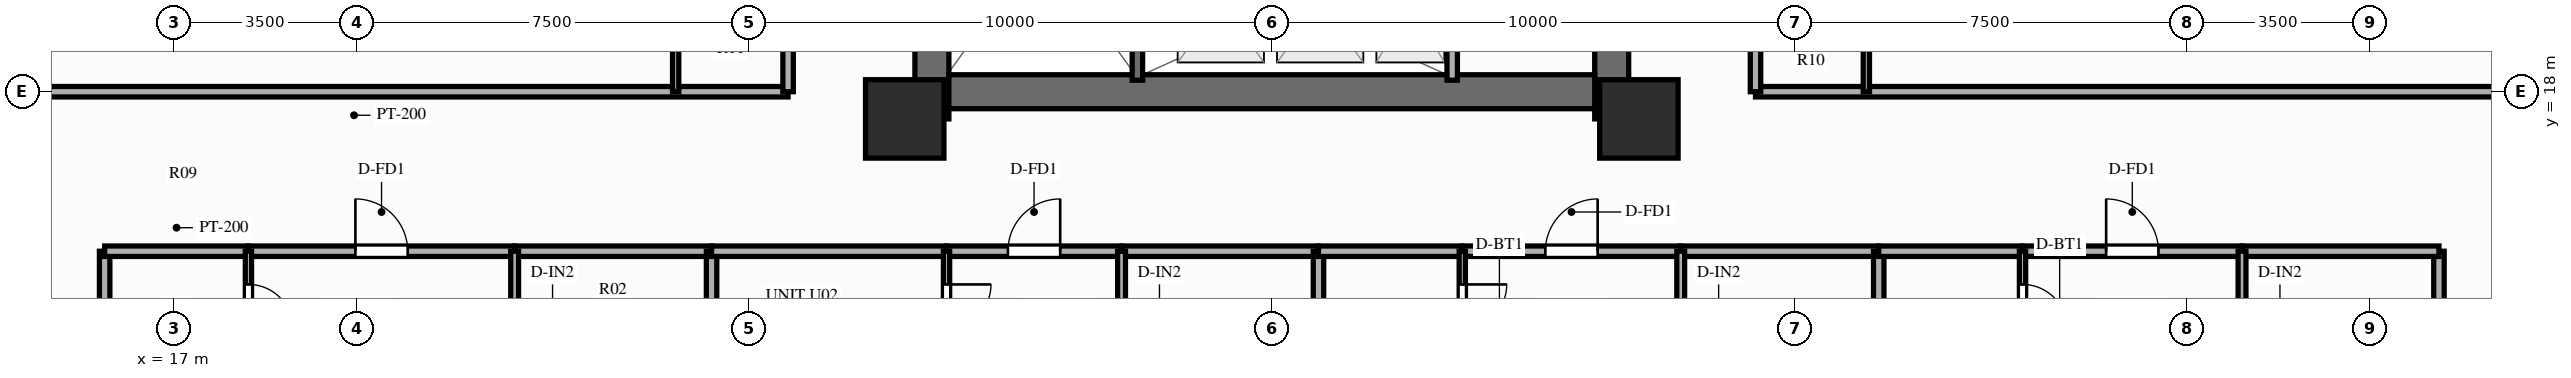
"""IFC4 building model, lengths in metres.
Left out: names, types, materials, properties, quantities, classifications, styles, units other than length and angle.
Written with IfcOpenShell. Run it as: python <this file> out.ifc"""

import sys

from ifc_helpers import new_model, si_unit, direction, frame, frame_2d, origin, origin_2d, place, context, subcontext, project, spatial, rectangle, extrude, source, transform, mapped, element, fill, save


model = new_model("IFC4")
c1 = context("Model", 3, precision=1e-05, world=origin(), true_north=direction((0.0, 1.0)))
c2 = subcontext(c1, "Body", "Model", "MODEL_VIEW")
j1 = project(units=[si_unit("LENGTHUNIT", "METRE"), si_unit("PLANEANGLEUNIT", "RADIAN")], contexts=[c1])
p1 = place(None, origin())
s1 = spatial("IfcSite", under=j1, at=p1, CompositionType="ELEMENT")
p2 = place(p1, origin())
s2 = spatial("IfcBuilding", under=s1, at=p2, CompositionType="ELEMENT")
p3 = place(p2, frame((0.0, 0.0, 34.4)))
s3 = spatial("IfcBuildingStorey", under=s2, at=p3, CompositionType="ELEMENT", Elevation=34.4)
p4 = place(p3, frame((31.5, 17.48, 0.0), z_axis=(0.0, 0.0, 1.0), x_axis=(0.0, 1.0, 0.0)))
e1 = element("IfcWall", 1, at=p4, inside=s3, PredefinedType="SHEAR", context=c2, shape_type="SweptSolid", body=[
    extrude(rectangle(XDim=19.04, YDim=0.65, at=frame_2d((9.52, 0.0))), origin(), (0.0, 0.0, 1.0), 3.0),
])
p5 = place(p4, frame((6.32, 0.0, 0.0)))
e2 = element("IfcOpeningElement", 2, at=p5, cuts=e1, PredefinedType="OPENING", context=c2, shape_type="SweptSolid", body=[
    extrude(rectangle(XDim=1.1, YDim=2.15, at=frame_2d((0.55, 1.075))), frame((0.0, 0.337, 0.0), z_axis=(0.0, -1.0, 0.0), x_axis=(1.0, 0.0, 0.0)), (0.0, 0.0, 1.0), 0.674),
])
p6 = place(p3, frame((44.5, 17.48, 0.0), z_axis=(0.0, 0.0, 1.0), x_axis=(0.0, 1.0, 0.0)))
e3 = element("IfcWall", 3, at=p6, inside=s3, PredefinedType="SHEAR", context=c2, shape_type="SweptSolid", body=[
    extrude(rectangle(XDim=19.04, YDim=0.65, at=frame_2d((9.52, 0.0))), origin(), (0.0, 0.0, 1.0), 3.0),
])
p7 = place(p6, frame((12.67, 0.0, 0.0), z_axis=(0.0, 0.0, 1.0), x_axis=(-1.0, 0.0, 0.0)))
e4 = element("IfcOpeningElement", 4, at=p7, cuts=e3, PredefinedType="OPENING", context=c2, shape_type="SweptSolid", body=[
    extrude(rectangle(XDim=1.1, YDim=2.15, at=frame_2d((0.55, 1.075))), frame((0.0, 0.337, 0.0), z_axis=(0.0, -1.0, 0.0), x_axis=(1.0, 0.0, 0.0)), (0.0, 0.0, 1.0), 0.674),
])
p8 = place(p3, frame((31.825, 18.0, 0.0), z_axis=(0.0, 0.0, 1.0), x_axis=(1.0, 0.0, 0.0)))
e5 = element("IfcWall", 5, at=p8, inside=s3, PredefinedType="SHEAR", context=c2, shape_type="SweptSolid", body=[
    extrude(rectangle(XDim=12.35, YDim=0.65, at=frame_2d((6.175, 0.0))), origin(), (0.0, 0.0, 1.0), 3.0),
])
m1 = source(origin(), c2, "Body", "SweptSolid", [
    extrude(rectangle(XDim=1.5, YDim=1.5, at=origin_2d()), origin(), (0.0, 0.0, 1.0), 3.0),
])
for number, where, z_axis, x_axis in (
    (6, (30.98, 17.48, 0.0), (0.0, 0.0, 1.0), (1.0, 0.0, 0.0)),
    (7, (45.02, 17.48, 0.0), (0.0, 0.0, 1.0), (1.0, 0.0, 0.0)),
):
    element("IfcColumn", number, at=place(p3, frame(where, z_axis=z_axis, x_axis=x_axis)), inside=s3, PredefinedType="COLUMN", context=c2, shape_type="MappedRepresentation", body=[
        mapped(m1, transform((0.0, 0.0, 0.0), scale=1.0)),
    ])
p9 = place(p3, frame((41.45, 18.22, 0.0), z_axis=(0.0, 0.0, 1.0), x_axis=(0.0, 1.0, 0.0)))
e8 = element("IfcWall", 8, at=p9, inside=s3, PredefinedType="PARTITIONING", context=c2, shape_type="SweptSolid", body=[
    extrude(rectangle(XDim=2.96, YDim=0.2, at=frame_2d((1.48, 0.0))), origin(), (0.0, 0.0, 1.0), 2.79),
])
p10 = place(p3, frame((35.43, 18.22, 0.0), z_axis=(0.0, 0.0, 1.0), x_axis=(0.0, 1.0, 0.0)))
e9 = element("IfcWall", 9, at=p10, inside=s3, PredefinedType="SOLIDWALL", context=c2, shape_type="SweptSolid", body=[
    extrude(rectangle(XDim=7.22, YDim=0.2, at=frame_2d((3.61, 0.0))), origin(), (0.0, 0.0, 1.0), 2.79),
])
p11 = place(p10, frame((6.68, 0.0, 0.0), z_axis=(0.0, 0.0, 1.0), x_axis=(-1.0, 0.0, 0.0)))
e10 = element("IfcOpeningElement", 10, at=p11, cuts=e9, PredefinedType="OPENING", context=c2, shape_type="SweptSolid", body=[
    extrude(rectangle(XDim=1.1, YDim=2.15, at=frame_2d((0.55, 1.075))), frame((0.0, 0.112, 0.0), z_axis=(0.0, -1.0, 0.0), x_axis=(1.0, 0.0, 0.0)), (0.0, 0.0, 1.0), 0.224),
])
for number, where, z_axis, x_axis in (
    (11, (15.68, 14.95, 0.0), (0.0, 0.0, 1.0), (0.0, -1.0, 0.0)),
    (12, (60.32, 14.95, 0.0), (0.0, 0.0, 1.0), (0.0, -1.0, 0.0)),
):
    element("IfcWall", number, at=place(p3, frame(where, z_axis=z_axis, x_axis=x_axis)), inside=s3, PredefinedType="PARTITIONING", context=c2, shape_type="SweptSolid", body=[
        extrude(rectangle(XDim=11.8, YDim=0.2, at=frame_2d((5.9, 0.0))), origin(), (0.0, 0.0, 1.0), 2.79),
    ])
p12 = place(p3, frame((15.68, 14.95, 0.0), z_axis=(0.0, 0.0, 1.0), x_axis=(1.0, 0.0, 0.0)))
e13 = element("IfcWall", 13, at=p12, inside=s3, PredefinedType="PARTITIONING", context=c2, shape_type="SweptSolid", body=[
    extrude(rectangle(XDim=2.75, YDim=0.2, at=frame_2d((1.375, 0.0))), origin(), (0.0, 0.0, 1.0), 2.79),
])
p13 = place(p3, frame((18.43, 14.95, 0.0), z_axis=(0.0, 0.0, 1.0), x_axis=(1.0, 0.0, 0.0)))
e14 = element("IfcWall", 14, at=p13, inside=s3, PredefinedType="PARTITIONING", context=c2, shape_type="SweptSolid", body=[
    extrude(rectangle(XDim=5.091, YDim=0.2, at=frame_2d((2.545, 0.0))), origin(), (0.0, 0.0, 1.0), 2.79),
])
p14 = place(p13, frame((2.045, 0.0, 0.0)))
e15 = element("IfcOpeningElement", 15, at=p14, cuts=e14, PredefinedType="OPENING", context=c2, shape_type="SweptSolid", body=[
    extrude(rectangle(XDim=1.0, YDim=2.15, at=frame_2d((0.5, 1.075))), frame((0.0, 0.112, 0.0), z_axis=(0.0, -1.0, 0.0), x_axis=(1.0, 0.0, 0.0)), (0.0, 0.0, 1.0), 0.224),
])
p15 = place(p3, frame((23.521, 14.95, 0.0), z_axis=(0.0, 0.0, 1.0), x_axis=(1.0, 0.0, 0.0)))
e16 = element("IfcWall", 16, at=p15, inside=s3, PredefinedType="PARTITIONING", context=c2, shape_type="SweptSolid", body=[
    extrude(rectangle(XDim=3.766, YDim=0.2, at=frame_2d((1.883, 0.0))), origin(), (0.0, 0.0, 1.0), 2.79),
])
p16 = place(p3, frame((18.43, 14.95, 0.0), z_axis=(0.0, 0.0, 1.0), x_axis=(0.0, -1.0, 0.0)))
e17 = element("IfcWall", 17, at=p16, inside=s3, PredefinedType="PARTITIONING", context=c2, shape_type="SweptSolid", body=[
    extrude(rectangle(XDim=2.12, YDim=0.12, at=frame_2d((1.06, 0.0))), origin(), (0.0, 0.0, 1.0), 2.79),
])
p17 = place(p16, frame((0.635, 0.0, 0.0)))
e18 = element("IfcOpeningElement", 18, at=p17, cuts=e17, PredefinedType="OPENING", context=c2, shape_type="SweptSolid", body=[
    extrude(rectangle(XDim=0.85, YDim=2.05, at=frame_2d((0.425, 1.025))), frame((0.0, 0.072, 0.0), z_axis=(0.0, -1.0, 0.0), x_axis=(1.0, 0.0, 0.0)), (0.0, 0.0, 1.0), 0.144),
])
p18 = place(p3, frame((23.521, 14.95, 0.0), z_axis=(0.0, 0.0, 1.0), x_axis=(0.0, -1.0, 0.0)))
e19 = element("IfcWall", 19, at=p18, inside=s3, PredefinedType="PARTITIONING", context=c2, shape_type="SweptSolid", body=[
    extrude(rectangle(XDim=3.17, YDim=0.15, at=frame_2d((1.585, 0.0))), origin(), (0.0, 0.0, 1.0), 2.79),
])
p19 = place(p18, frame((1.135, 0.0, 0.0)))
e20 = element("IfcOpeningElement", 20, at=p19, cuts=e19, PredefinedType="OPENING", context=c2, shape_type="SweptSolid", body=[
    extrude(rectangle(XDim=0.9, YDim=2.1, at=frame_2d((0.45, 1.05))), frame((0.0, 0.087, 0.0), z_axis=(0.0, -1.0, 0.0), x_axis=(1.0, 0.0, 0.0)), (0.0, 0.0, 1.0), 0.174),
])
p20 = place(p3, frame((27.286, 14.95, 0.0), z_axis=(0.0, 0.0, 1.0), x_axis=(0.0, -1.0, 0.0)))
e21 = element("IfcWall", 21, at=p20, inside=s3, PredefinedType="PARTITIONING", context=c2, shape_type="SweptSolid", body=[
    extrude(rectangle(XDim=11.8, YDim=0.2, at=frame_2d((5.9, 0.0))), origin(), (0.0, 0.0, 1.0), 2.79),
])
p21 = place(p3, frame((27.286, 14.95, 0.0), z_axis=(0.0, 0.0, 1.0), x_axis=(1.0, 0.0, 0.0)))
e22 = element("IfcWall", 22, at=p21, inside=s3, PredefinedType="PARTITIONING", context=c2, shape_type="SweptSolid", body=[
    extrude(rectangle(XDim=4.494, YDim=0.2, at=frame_2d((2.247, 0.0))), origin(), (0.0, 0.0, 1.0), 2.79),
])
p22 = place(p3, frame((31.78, 14.95, 0.0), z_axis=(0.0, 0.0, 1.0), x_axis=(1.0, 0.0, 0.0)))
e23 = element("IfcWall", 23, at=p22, inside=s3, PredefinedType="PARTITIONING", context=c2, shape_type="SweptSolid", body=[
    extrude(rectangle(XDim=3.347, YDim=0.2, at=frame_2d((1.673, 0.0))), origin(), (0.0, 0.0, 1.0), 2.79),
])
p23 = place(p22, frame((1.173, 0.0, 0.0)))
e24 = element("IfcOpeningElement", 24, at=p23, cuts=e23, PredefinedType="OPENING", context=c2, shape_type="SweptSolid", body=[
    extrude(rectangle(XDim=1.0, YDim=2.15, at=frame_2d((0.5, 1.075))), frame((0.0, 0.112, 0.0), z_axis=(0.0, -1.0, 0.0), x_axis=(1.0, 0.0, 0.0)), (0.0, 0.0, 1.0), 0.224),
])
p24 = place(p3, frame((35.127, 14.95, 0.0), z_axis=(0.0, 0.0, 1.0), x_axis=(1.0, 0.0, 0.0)))
e25 = element("IfcWall", 25, at=p24, inside=s3, PredefinedType="PARTITIONING", context=c2, shape_type="SweptSolid", body=[
    extrude(rectangle(XDim=3.766, YDim=0.2, at=frame_2d((1.883, 0.0))), origin(), (0.0, 0.0, 1.0), 2.79),
])
p25 = place(p3, frame((31.78, 14.95, 0.0), z_axis=(0.0, 0.0, 1.0), x_axis=(0.0, -1.0, 0.0)))
e26 = element("IfcWall", 26, at=p25, inside=s3, PredefinedType="PARTITIONING", context=c2, shape_type="SweptSolid", body=[
    extrude(rectangle(XDim=2.12, YDim=0.12, at=frame_2d((1.06, 0.0))), origin(), (0.0, 0.0, 1.0), 2.79),
])
p26 = place(p25, frame((0.635, 0.0, 0.0)))
e27 = element("IfcOpeningElement", 27, at=p26, cuts=e26, PredefinedType="OPENING", context=c2, shape_type="SweptSolid", body=[
    extrude(rectangle(XDim=0.85, YDim=2.05, at=frame_2d((0.425, 1.025))), frame((0.0, 0.072, 0.0), z_axis=(0.0, -1.0, 0.0), x_axis=(1.0, 0.0, 0.0)), (0.0, 0.0, 1.0), 0.144),
])
p27 = place(p3, frame((35.127, 14.95, 0.0), z_axis=(0.0, 0.0, 1.0), x_axis=(0.0, -1.0, 0.0)))
e28 = element("IfcWall", 28, at=p27, inside=s3, PredefinedType="PARTITIONING", context=c2, shape_type="SweptSolid", body=[
    extrude(rectangle(XDim=3.17, YDim=0.15, at=frame_2d((1.585, 0.0))), origin(), (0.0, 0.0, 1.0), 2.79),
])
p28 = place(p27, frame((1.135, 0.0, 0.0)))
e29 = element("IfcOpeningElement", 29, at=p28, cuts=e28, PredefinedType="OPENING", context=c2, shape_type="SweptSolid", body=[
    extrude(rectangle(XDim=0.9, YDim=2.1, at=frame_2d((0.45, 1.05))), frame((0.0, 0.087, 0.0), z_axis=(0.0, -1.0, 0.0), x_axis=(1.0, 0.0, 0.0)), (0.0, 0.0, 1.0), 0.174),
])
p29 = place(p3, frame((38.893, 14.95, 0.0), z_axis=(0.0, 0.0, 1.0), x_axis=(0.0, -1.0, 0.0)))
e30 = element("IfcWall", 30, at=p29, inside=s3, PredefinedType="PARTITIONING", context=c2, shape_type="SweptSolid", body=[
    extrude(rectangle(XDim=11.8, YDim=0.2, at=frame_2d((5.9, 0.0))), origin(), (0.0, 0.0, 1.0), 2.79),
])
p30 = place(p3, frame((38.893, 14.95, 0.0), z_axis=(0.0, 0.0, 1.0), x_axis=(1.0, 0.0, 0.0)))
e31 = element("IfcWall", 31, at=p30, inside=s3, PredefinedType="PARTITIONING", context=c2, shape_type="SweptSolid", body=[
    extrude(rectangle(XDim=2.75, YDim=0.2, at=frame_2d((1.375, 0.0))), origin(), (0.0, 0.0, 1.0), 2.79),
])
p31 = place(p3, frame((41.643, 14.95, 0.0), z_axis=(0.0, 0.0, 1.0), x_axis=(1.0, 0.0, 0.0)))
e32 = element("IfcWall", 32, at=p31, inside=s3, PredefinedType="PARTITIONING", context=c2, shape_type="SweptSolid", body=[
    extrude(rectangle(XDim=4.177, YDim=0.2, at=frame_2d((2.089, 0.0))), origin(), (0.0, 0.0, 1.0), 2.79),
])
p32 = place(p31, frame((1.589, 0.0, 0.0)))
e33 = element("IfcOpeningElement", 33, at=p32, cuts=e32, PredefinedType="OPENING", context=c2, shape_type="SweptSolid", body=[
    extrude(rectangle(XDim=1.0, YDim=2.15, at=frame_2d((0.5, 1.075))), frame((0.0, 0.112, 0.0), z_axis=(0.0, -1.0, 0.0), x_axis=(1.0, 0.0, 0.0)), (0.0, 0.0, 1.0), 0.224),
])
p33 = place(p3, frame((45.82, 14.95, 0.0), z_axis=(0.0, 0.0, 1.0), x_axis=(1.0, 0.0, 0.0)))
e34 = element("IfcWall", 34, at=p33, inside=s3, PredefinedType="PARTITIONING", context=c2, shape_type="SweptSolid", body=[
    extrude(rectangle(XDim=3.786, YDim=0.2, at=frame_2d((1.893, 0.0))), origin(), (0.0, 0.0, 1.0), 2.79),
])
p34 = place(p3, frame((41.643, 14.95, 0.0), z_axis=(0.0, 0.0, 1.0), x_axis=(0.0, -1.0, 0.0)))
e35 = element("IfcWall", 35, at=p34, inside=s3, PredefinedType="PARTITIONING", context=c2, shape_type="SweptSolid", body=[
    extrude(rectangle(XDim=2.12, YDim=0.12, at=frame_2d((1.06, 0.0))), origin(), (0.0, 0.0, 1.0), 2.79),
])
p35 = place(p34, frame((0.635, 0.0, 0.0)))
e36 = element("IfcOpeningElement", 36, at=p35, cuts=e35, PredefinedType="OPENING", context=c2, shape_type="SweptSolid", body=[
    extrude(rectangle(XDim=0.85, YDim=2.05, at=frame_2d((0.425, 1.025))), frame((0.0, 0.072, 0.0), z_axis=(0.0, -1.0, 0.0), x_axis=(1.0, 0.0, 0.0)), (0.0, 0.0, 1.0), 0.144),
])
p36 = place(p3, frame((45.82, 14.95, 0.0), z_axis=(0.0, 0.0, 1.0), x_axis=(0.0, -1.0, 0.0)))
e37 = element("IfcWall", 37, at=p36, inside=s3, PredefinedType="PARTITIONING", context=c2, shape_type="SweptSolid", body=[
    extrude(rectangle(XDim=3.17, YDim=0.15, at=frame_2d((1.585, 0.0))), origin(), (0.0, 0.0, 1.0), 2.79),
])
p37 = place(p36, frame((1.135, 0.0, 0.0)))
e38 = element("IfcOpeningElement", 38, at=p37, cuts=e37, PredefinedType="OPENING", context=c2, shape_type="SweptSolid", body=[
    extrude(rectangle(XDim=0.9, YDim=2.1, at=frame_2d((0.45, 1.05))), frame((0.0, 0.087, 0.0), z_axis=(0.0, -1.0, 0.0), x_axis=(1.0, 0.0, 0.0)), (0.0, 0.0, 1.0), 0.174),
])
p38 = place(p3, frame((49.606, 14.95, 0.0), z_axis=(0.0, 0.0, 1.0), x_axis=(0.0, -1.0, 0.0)))
e39 = element("IfcWall", 39, at=p38, inside=s3, PredefinedType="PARTITIONING", context=c2, shape_type="SweptSolid", body=[
    extrude(rectangle(XDim=11.8, YDim=0.2, at=frame_2d((5.9, 0.0))), origin(), (0.0, 0.0, 1.0), 2.79),
])
p39 = place(p3, frame((49.606, 14.95, 0.0), z_axis=(0.0, 0.0, 1.0), x_axis=(1.0, 0.0, 0.0)))
e40 = element("IfcWall", 40, at=p39, inside=s3, PredefinedType="PARTITIONING", context=c2, shape_type="SweptSolid", body=[
    extrude(rectangle(XDim=2.75, YDim=0.2, at=frame_2d((1.375, 0.0))), origin(), (0.0, 0.0, 1.0), 2.79),
])
p40 = place(p3, frame((52.356, 14.95, 0.0), z_axis=(0.0, 0.0, 1.0), x_axis=(1.0, 0.0, 0.0)))
e41 = element("IfcWall", 41, at=p40, inside=s3, PredefinedType="PARTITIONING", context=c2, shape_type="SweptSolid", body=[
    extrude(rectangle(XDim=4.198, YDim=0.2, at=frame_2d((2.099, 0.0))), origin(), (0.0, 0.0, 1.0), 2.79),
])
p41 = place(p40, frame((1.599, 0.0, 0.0)))
e42 = element("IfcOpeningElement", 42, at=p41, cuts=e41, PredefinedType="OPENING", context=c2, shape_type="SweptSolid", body=[
    extrude(rectangle(XDim=1.0, YDim=2.15, at=frame_2d((0.5, 1.075))), frame((0.0, 0.112, 0.0), z_axis=(0.0, -1.0, 0.0), x_axis=(1.0, 0.0, 0.0)), (0.0, 0.0, 1.0), 0.224),
])
p42 = place(p3, frame((56.554, 14.95, 0.0), z_axis=(0.0, 0.0, 1.0), x_axis=(1.0, 0.0, 0.0)))
e43 = element("IfcWall", 43, at=p42, inside=s3, PredefinedType="PARTITIONING", context=c2, shape_type="SweptSolid", body=[
    extrude(rectangle(XDim=3.766, YDim=0.2, at=frame_2d((1.883, 0.0))), origin(), (0.0, 0.0, 1.0), 2.79),
])
p43 = place(p3, frame((52.356, 14.95, 0.0), z_axis=(0.0, 0.0, 1.0), x_axis=(0.0, -1.0, 0.0)))
e44 = element("IfcWall", 44, at=p43, inside=s3, PredefinedType="PARTITIONING", context=c2, shape_type="SweptSolid", body=[
    extrude(rectangle(XDim=2.12, YDim=0.12, at=frame_2d((1.06, 0.0))), origin(), (0.0, 0.0, 1.0), 2.79),
])
p44 = place(p43, frame((0.635, 0.0, 0.0)))
e45 = element("IfcOpeningElement", 45, at=p44, cuts=e44, PredefinedType="OPENING", context=c2, shape_type="SweptSolid", body=[
    extrude(rectangle(XDim=0.85, YDim=2.05, at=frame_2d((0.425, 1.025))), frame((0.0, 0.072, 0.0), z_axis=(0.0, -1.0, 0.0), x_axis=(1.0, 0.0, 0.0)), (0.0, 0.0, 1.0), 0.144),
])
p45 = place(p3, frame((56.554, 14.95, 0.0), z_axis=(0.0, 0.0, 1.0), x_axis=(0.0, -1.0, 0.0)))
e46 = element("IfcWall", 46, at=p45, inside=s3, PredefinedType="PARTITIONING", context=c2, shape_type="SweptSolid", body=[
    extrude(rectangle(XDim=3.17, YDim=0.15, at=frame_2d((1.585, 0.0))), origin(), (0.0, 0.0, 1.0), 2.79),
])
p46 = place(p45, frame((1.135, 0.0, 0.0)))
e47 = element("IfcOpeningElement", 47, at=p46, cuts=e46, PredefinedType="OPENING", context=c2, shape_type="SweptSolid", body=[
    extrude(rectangle(XDim=0.9, YDim=2.1, at=frame_2d((0.45, 1.05))), frame((0.0, 0.087, 0.0), z_axis=(0.0, -1.0, 0.0), x_axis=(1.0, 0.0, 0.0)), (0.0, 0.0, 1.0), 0.174),
])
p47 = place(p3, frame((28.75, 18.0, 0.0), z_axis=(0.0, 0.0, 1.0), x_axis=(-1.0, 0.0, 0.0)))
e48 = element("IfcWall", 48, at=p47, inside=s3, PredefinedType="PARTITIONING", context=c2, shape_type="SweptSolid", body=[
    extrude(rectangle(XDim=16.6, YDim=0.2, at=frame_2d((8.3, 0.0))), origin(), (0.0, 0.0, 1.0), 2.24),
])
p48 = place(p3, frame((28.75, 18.0, 0.0), z_axis=(0.0, 0.0, 1.0), x_axis=(0.0, 1.0, 0.0)))
e49 = element("IfcWall", 49, at=p48, inside=s3, PredefinedType="PARTITIONING", context=c2, shape_type="SweptSolid", body=[
    extrude(rectangle(XDim=2.807, YDim=0.2, at=frame_2d((1.404, 0.0))), origin(), (0.0, 0.0, 1.0), 2.79),
])
p49 = place(p3, frame((26.6, 18.0, 0.0), z_axis=(0.0, 0.0, 1.0), x_axis=(0.0, 1.0, 0.0)))
e50 = element("IfcWall", 50, at=p49, inside=s3, PredefinedType="PARTITIONING", context=c2, shape_type="SweptSolid", body=[
    extrude(rectangle(XDim=2.807, YDim=0.12, at=frame_2d((1.404, 0.0))), origin(), (0.0, 0.0, 1.0), 2.79),
])
p50 = place(p3, frame((47.25, 18.0, 0.0), z_axis=(0.0, 0.0, 1.0), x_axis=(1.0, 0.0, 0.0)))
e51 = element("IfcWall", 51, at=p50, inside=s3, PredefinedType="PARTITIONING", context=c2, shape_type="SweptSolid", body=[
    extrude(rectangle(XDim=16.6, YDim=0.2, at=frame_2d((8.3, 0.0))), origin(), (0.0, 0.0, 1.0), 2.24),
])
p51 = place(p3, frame((47.25, 18.0, 0.0), z_axis=(0.0, 0.0, 1.0), x_axis=(0.0, 1.0, 0.0)))
e52 = element("IfcWall", 52, at=p51, inside=s3, PredefinedType="PARTITIONING", context=c2, shape_type="SweptSolid", body=[
    extrude(rectangle(XDim=2.513, YDim=0.2, at=frame_2d((1.256, 0.0))), origin(), (0.0, 0.0, 1.0), 2.79),
])
p52 = place(p3, frame((49.37, 18.0, 0.0), z_axis=(0.0, 0.0, 1.0), x_axis=(0.0, 1.0, 0.0)))
e53 = element("IfcWall", 53, at=p52, inside=s3, PredefinedType="PARTITIONING", context=c2, shape_type="SweptSolid", body=[
    extrude(rectangle(XDim=2.513, YDim=0.12, at=frame_2d((1.256, 0.0))), origin(), (0.0, 0.0, 1.0), 2.79),
])
m2 = source(origin(), c2, "Body", "SweptSolid", [
    extrude(rectangle(XDim=1.0, YDim=2.15, at=frame_2d((0.5, 1.075))), frame((0.0, 0.025, 0.0), z_axis=(0.0, -1.0, 0.0), x_axis=(1.0, 0.0, 0.0)), (0.0, 0.0, 1.0), 0.05),
])
p53 = place(p14, origin())
e54 = element("IfcDoor", 54, at=p53, inside=s3, OperationType="SINGLE_SWING_LEFT", PredefinedType="DOOR", context=c2, shape_type="MappedRepresentation", body=[
    mapped(m2, transform((0.0, 0.0, 0.0), scale=1.0)),
])
fill(e15, e54)
m3 = source(origin(), c2, "Body", "SweptSolid", [
    extrude(rectangle(XDim=0.85, YDim=2.05, at=frame_2d((0.425, 1.025))), frame((0.0, 0.025, 0.0), z_axis=(0.0, -1.0, 0.0), x_axis=(1.0, 0.0, 0.0)), (0.0, 0.0, 1.0), 0.05),
])
p54 = place(p17, origin())
e55 = element("IfcDoor", 55, at=p54, inside=s3, OperationType="SINGLE_SWING_RIGHT", PredefinedType="DOOR", context=c2, shape_type="MappedRepresentation", body=[
    mapped(m3, transform((0.0, 0.0, 0.0), scale=1.0)),
])
fill(e18, e55)
p55 = place(p23, origin())
e56 = element("IfcDoor", 56, at=p55, inside=s3, OperationType="SINGLE_SWING_RIGHT", PredefinedType="DOOR", context=c2, shape_type="MappedRepresentation", body=[
    mapped(m2, transform((0.0, 0.0, 0.0), scale=1.0)),
])
fill(e24, e56)
p56 = place(p26, origin())
e57 = element("IfcDoor", 57, at=p56, inside=s3, OperationType="SINGLE_SWING_LEFT", PredefinedType="DOOR", context=c2, shape_type="MappedRepresentation", body=[
    mapped(m3, transform((0.0, 0.0, 0.0), scale=1.0)),
])
fill(e27, e57)
p57 = place(p32, origin())
e58 = element("IfcDoor", 58, at=p57, inside=s3, OperationType="SINGLE_SWING_RIGHT", PredefinedType="DOOR", context=c2, shape_type="MappedRepresentation", body=[
    mapped(m2, transform((0.0, 0.0, 0.0), scale=1.0)),
])
fill(e33, e58)
p58 = place(p35, origin())
e59 = element("IfcDoor", 59, at=p58, inside=s3, OperationType="SINGLE_SWING_LEFT", PredefinedType="DOOR", context=c2, shape_type="MappedRepresentation", body=[
    mapped(m3, transform((0.0, 0.0, 0.0), scale=1.0)),
])
fill(e36, e59)
p59 = place(p41, origin())
e60 = element("IfcDoor", 60, at=p59, inside=s3, OperationType="SINGLE_SWING_LEFT", PredefinedType="DOOR", context=c2, shape_type="MappedRepresentation", body=[
    mapped(m2, transform((0.0, 0.0, 0.0), scale=1.0)),
])
fill(e42, e60)
p60 = place(p44, origin())
e61 = element("IfcDoor", 61, at=p60, inside=s3, OperationType="SINGLE_SWING_RIGHT", PredefinedType="DOOR", context=c2, shape_type="MappedRepresentation", body=[
    mapped(m3, transform((0.0, 0.0, 0.0), scale=1.0)),
])
fill(e45, e61)
save(model, sys.argv[1])
